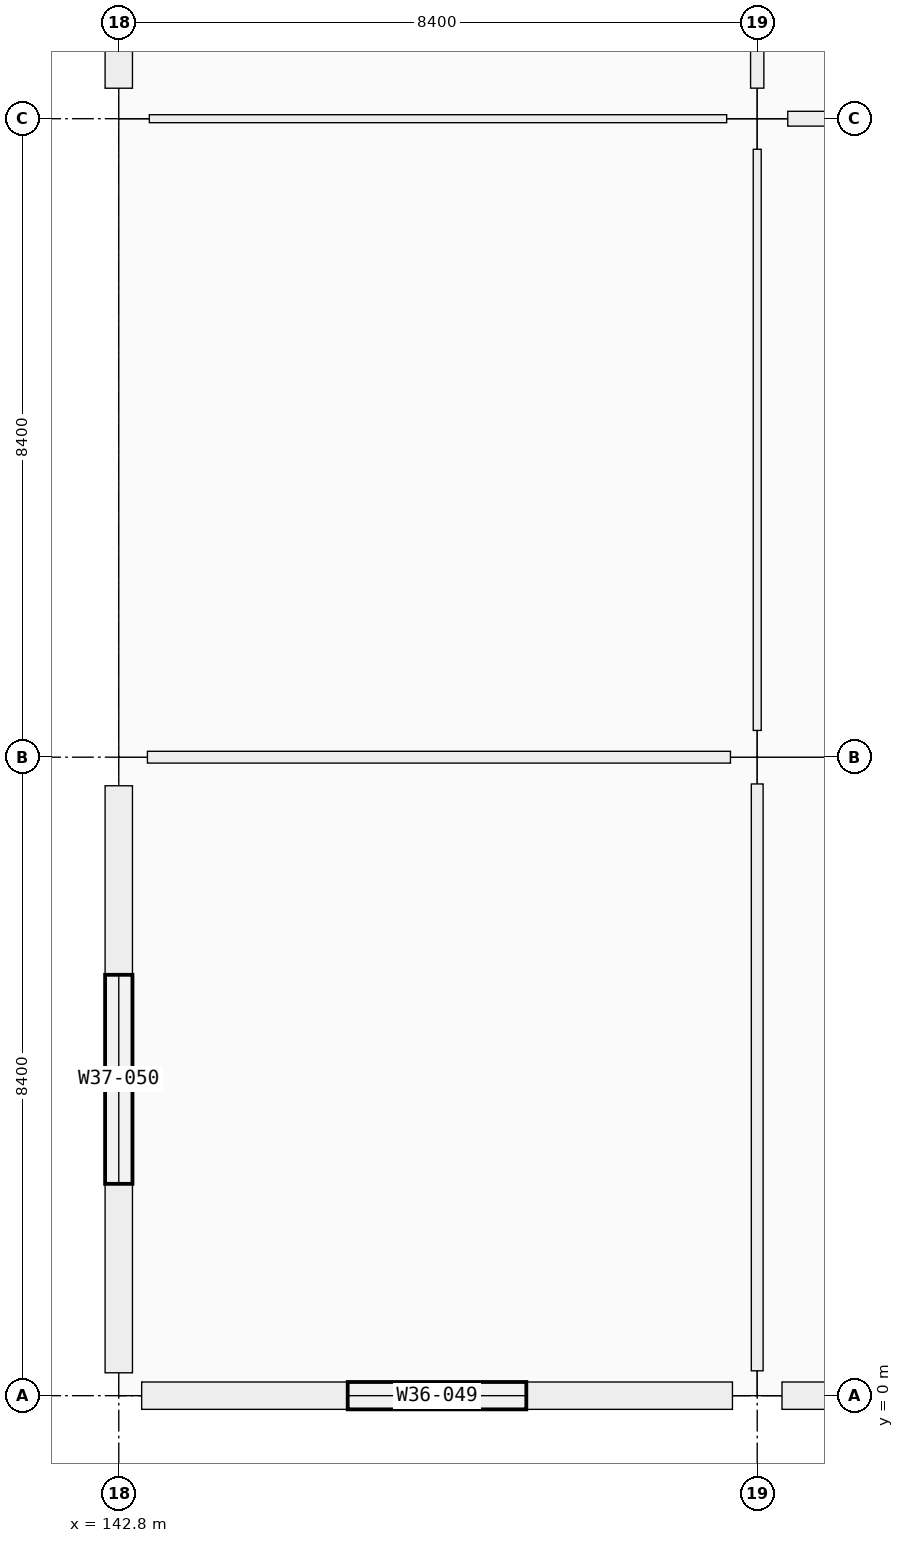
"""IFC4 building model, lengths in metres.
Left out: names, types, materials, properties, quantities, classifications, styles, units other than length and angle.
Written with IfcOpenShell. Run it as: python <this file> out.ifc"""

import sys

from ifc_helpers import new_model, si_unit, direction, frame, frame_2d, origin, origin_2d, place, context, subcontext, project, spatial, rectangle, extrude, element, fill, save


model = new_model("IFC4")
c1 = context("Model", 3, precision=1e-05, world=origin(), true_north=direction((0.0, 1.0)))
c2 = subcontext(c1, "Body", "Model", "MODEL_VIEW")
j1 = project(units=[si_unit("LENGTHUNIT", "METRE"), si_unit("PLANEANGLEUNIT", "RADIAN")], contexts=[c1])
p1 = place(None, origin())
s1 = spatial("IfcSite", under=j1, at=p1, CompositionType="ELEMENT")
p2 = place(p1, origin())
s2 = spatial("IfcBuilding", under=s1, at=p2, CompositionType="ELEMENT")
p3 = place(p2, origin())
s3 = spatial("IfcBuildingStorey", under=s2, at=p3, CompositionType="ELEMENT", Elevation=0.0)
p4 = place(p3, frame((142.8, 0.0, 0.0), z_axis=(0.0, 0.0, 1.0), x_axis=(1.0, 0.0, 0.0)))
e1 = element("IfcColumn", 1, at=p4, inside=s3, PredefinedType="COLUMN", context=c2, shape_type="SweptSolid", body=[
    extrude(rectangle(XDim=0.6, YDim=0.6, at=origin_2d()), origin(), (0.0, 0.0, 1.0), 5.76),
])
p5 = place(p3, frame((142.8, 8.4, 0.0), z_axis=(0.0, 0.0, 1.0), x_axis=(1.0, 0.0, 0.0)))
e2 = element("IfcColumn", 2, at=p5, inside=s3, PredefinedType="COLUMN", context=c2, shape_type="SweptSolid", body=[
    extrude(rectangle(XDim=0.75, YDim=0.75, at=origin_2d()), origin(), (0.0, 0.0, 1.0), 5.76),
])
p6 = place(p3, frame((142.8, 16.8, 0.0), z_axis=(0.0, 0.0, 1.0), x_axis=(1.0, 0.0, 0.0)))
e3 = element("IfcColumn", 3, at=p6, inside=s3, PredefinedType="COLUMN", context=c2, shape_type="SweptSolid", body=[
    extrude(rectangle(XDim=0.8, YDim=0.8, at=origin_2d()), origin(), (0.0, 0.0, 1.0), 5.76),
])
p7 = place(p3, frame((151.2, 0.0, 0.0), z_axis=(0.0, 0.0, 1.0), x_axis=(1.0, 0.0, 0.0)))
e4 = element("IfcColumn", 4, at=p7, inside=s3, PredefinedType="COLUMN", context=c2, shape_type="SweptSolid", body=[
    extrude(rectangle(XDim=0.65, YDim=0.65, at=origin_2d()), origin(), (0.0, 0.0, 1.0), 5.76),
])
p8 = place(p3, frame((151.2, 8.4, 0.0), z_axis=(0.0, 0.0, 1.0), x_axis=(1.0, 0.0, 0.0)))
e5 = element("IfcColumn", 5, at=p8, inside=s3, PredefinedType="COLUMN", context=c2, shape_type="SweptSolid", body=[
    extrude(rectangle(XDim=0.7, YDim=0.7, at=origin_2d()), origin(), (0.0, 0.0, 1.0), 5.76),
])
p9 = place(p3, frame((151.2, 16.8, 0.0), z_axis=(0.0, 0.0, 1.0), x_axis=(1.0, 0.0, 0.0)))
e6 = element("IfcColumn", 6, at=p9, inside=s3, PredefinedType="COLUMN", context=c2, shape_type="SweptSolid", body=[
    extrude(rectangle(XDim=0.8, YDim=0.8, at=origin_2d()), origin(), (0.0, 0.0, 1.0), 5.76),
])
p10 = place(p3, frame((150.874, 0.0, 0.0), z_axis=(0.0, 0.0, 1.0), x_axis=(-1.0, 0.0, 0.0)))
e7 = element("IfcWall", 7, at=p10, inside=s3, PredefinedType="SOLIDWALL", context=c2, shape_type="SweptSolid", body=[
    extrude(rectangle(XDim=7.773, YDim=0.36, at=frame_2d((3.886, 0.0))), origin(), (0.0, 0.0, 1.0), 4.7),
])
p11 = place(p10, frame((2.712, 0.0, 0.9)))
e8 = element("IfcOpeningElement", 8, at=p11, cuts=e7, PredefinedType="OPENING", context=c2, shape_type="SweptSolid", body=[
    extrude(rectangle(XDim=2.35, YDim=1.6, at=frame_2d((1.175, 0.8))), frame((0.0, 0.18, 0.0), z_axis=(0.0, -1.0, 0.0), x_axis=(1.0, 0.0, 0.0)), (0.0, 0.0, 1.0), 0.36),
])
p12 = place(p3, frame((142.8, 0.301, 0.0), z_axis=(0.0, 0.0, 1.0), x_axis=(0.0, 1.0, 0.0)))
e9 = element("IfcWall", 9, at=p12, inside=s3, PredefinedType="SOLIDWALL", context=c2, shape_type="SweptSolid", body=[
    extrude(rectangle(XDim=7.723, YDim=0.36, at=frame_2d((3.861, 0.0))), origin(), (0.0, 0.0, 1.0), 4.7),
])
p13 = place(p12, frame((2.486, 0.0, 0.9)))
e10 = element("IfcOpeningElement", 10, at=p13, cuts=e9, PredefinedType="OPENING", context=c2, shape_type="SweptSolid", body=[
    extrude(rectangle(XDim=2.75, YDim=1.6, at=frame_2d((1.375, 0.8))), frame((0.0, 0.18, 0.0), z_axis=(0.0, -1.0, 0.0), x_axis=(1.0, 0.0, 0.0)), (0.0, 0.0, 1.0), 0.36),
])
p14 = place(p3, frame((142.8, 17.201, 0.0), z_axis=(0.0, 0.0, 1.0), x_axis=(0.0, 1.0, 0.0)))
e11 = element("IfcWall", 11, at=p14, inside=s3, PredefinedType="SOLIDWALL", context=c2, shape_type="SweptSolid", body=[
    extrude(rectangle(XDim=7.598, YDim=0.36, at=frame_2d((3.799, 0.0))), origin(), (0.0, 0.0, 1.0), 4.7),
])
p15 = place(p14, frame((3.024, 0.0, 0.9)))
e12 = element("IfcOpeningElement", 12, at=p15, cuts=e11, PredefinedType="OPENING", context=c2, shape_type="SweptSolid", body=[
    extrude(rectangle(XDim=1.55, YDim=1.6, at=frame_2d((0.775, 0.8))), frame((0.0, 0.18, 0.0), z_axis=(0.0, -1.0, 0.0), x_axis=(1.0, 0.0, 0.0)), (0.0, 0.0, 1.0), 0.36),
])
p16 = place(p3, frame((159.299, 0.0, 0.0), z_axis=(0.0, 0.0, 1.0), x_axis=(-1.0, 0.0, 0.0)))
e13 = element("IfcWall", 13, at=p16, inside=s3, PredefinedType="SOLIDWALL", context=c2, shape_type="SweptSolid", body=[
    extrude(rectangle(XDim=7.773, YDim=0.36, at=frame_2d((3.887, 0.0))), origin(), (0.0, 0.0, 1.0), 4.7),
])
p17 = place(p16, frame((2.736, 0.0, 0.0)))
e14 = element("IfcOpeningElement", 14, at=p17, cuts=e13, PredefinedType="OPENING", context=c2, shape_type="SweptSolid", body=[
    extrude(rectangle(XDim=2.3, YDim=2.3, at=frame_2d((1.15, 1.15))), frame((0.0, 0.18, 0.0), z_axis=(0.0, -1.0, 0.0), x_axis=(1.0, 0.0, 0.0)), (0.0, 0.0, 1.0), 0.36),
])
p18 = place(p3, frame((143.177, 8.4, 0.0), z_axis=(0.0, 0.0, 1.0), x_axis=(1.0, 0.0, 0.0)))
e15 = element("IfcWall", 15, at=p18, inside=s3, PredefinedType="PARTITIONING", context=c2, shape_type="SweptSolid", body=[
    extrude(rectangle(XDim=7.671, YDim=0.155, at=frame_2d((3.835, 0.0))), origin(), (0.0, 0.0, 1.0), 3.66),
])
p19 = place(p18, frame((3.331, 0.0, 0.0)))
e16 = element("IfcOpeningElement", 16, at=p19, cuts=e15, PredefinedType="OPENING", context=c2, shape_type="SweptSolid", body=[
    extrude(rectangle(XDim=1.01, YDim=2.12, at=frame_2d((0.505, 1.06))), frame((0.0, 0.078, 0.0), z_axis=(0.0, -1.0, 0.0), x_axis=(1.0, 0.0, 0.0)), (0.0, 0.0, 1.0), 0.155),
])
p20 = place(p3, frame((143.202, 16.8, 0.0), z_axis=(0.0, 0.0, 1.0), x_axis=(1.0, 0.0, 0.0)))
e17 = element("IfcWall", 17, at=p20, inside=s3, PredefinedType="PARTITIONING", context=c2, shape_type="SweptSolid", body=[
    extrude(rectangle(XDim=7.596, YDim=0.105, at=frame_2d((3.798, 0.0))), origin(), (0.0, 0.0, 1.0), 3.66),
])
p21 = place(p20, frame((3.313, 0.0, 0.0)))
e18 = element("IfcOpeningElement", 18, at=p21, cuts=e17, PredefinedType="OPENING", context=c2, shape_type="SweptSolid", body=[
    extrude(rectangle(XDim=0.97, YDim=2.12, at=frame_2d((0.485, 1.06))), frame((0.0, 0.052, 0.0), z_axis=(0.0, -1.0, 0.0), x_axis=(1.0, 0.0, 0.0)), (0.0, 0.0, 1.0), 0.105),
])
p22 = place(p3, frame((151.602, 16.8, 0.0), z_axis=(0.0, 0.0, 1.0), x_axis=(1.0, 0.0, 0.0)))
e19 = element("IfcWall", 19, at=p22, inside=s3, PredefinedType="PARTITIONING", context=c2, shape_type="SweptSolid", body=[
    extrude(rectangle(XDim=7.596, YDim=0.195, at=frame_2d((3.798, 0.0))), origin(), (0.0, 0.0, 1.0), 3.66),
])
p23 = place(p22, frame((3.288, 0.0, 0.0)))
e20 = element("IfcOpeningElement", 20, at=p23, cuts=e19, PredefinedType="OPENING", context=c2, shape_type="SweptSolid", body=[
    extrude(rectangle(XDim=1.02, YDim=2.2, at=frame_2d((0.51, 1.1))), frame((0.0, 0.098, 0.0), z_axis=(0.0, -1.0, 0.0), x_axis=(1.0, 0.0, 0.0)), (0.0, 0.0, 1.0), 0.195),
])
p24 = place(p3, frame((151.2, 0.327, 0.0), z_axis=(0.0, 0.0, 1.0), x_axis=(0.0, 1.0, 0.0)))
e21 = element("IfcWall", 21, at=p24, inside=s3, PredefinedType="PARTITIONING", context=c2, shape_type="SweptSolid", body=[
    extrude(rectangle(XDim=7.721, YDim=0.155, at=frame_2d((3.861, 0.0))), origin(), (0.0, 0.0, 1.0), 3.66),
])
p25 = place(p24, frame((3.376, 0.0, 0.0)))
e22 = element("IfcOpeningElement", 22, at=p25, cuts=e21, PredefinedType="OPENING", context=c2, shape_type="SweptSolid", body=[
    extrude(rectangle(XDim=0.97, YDim=2.12, at=frame_2d((0.485, 1.06))), frame((0.0, 0.078, 0.0), z_axis=(0.0, -1.0, 0.0), x_axis=(1.0, 0.0, 0.0)), (0.0, 0.0, 1.0), 0.155),
])
p26 = place(p3, frame((151.2, 8.752, 0.0), z_axis=(0.0, 0.0, 1.0), x_axis=(0.0, 1.0, 0.0)))
e23 = element("IfcWall", 23, at=p26, inside=s3, PredefinedType="PARTITIONING", context=c2, shape_type="SweptSolid", body=[
    extrude(rectangle(XDim=7.646, YDim=0.105, at=frame_2d((3.823, 0.0))), origin(), (0.0, 0.0, 1.0), 3.66),
])
p27 = place(p26, frame((3.358, 0.0, 0.0)))
e24 = element("IfcOpeningElement", 24, at=p27, cuts=e23, PredefinedType="OPENING", context=c2, shape_type="SweptSolid", body=[
    extrude(rectangle(XDim=0.93, YDim=2.12, at=frame_2d((0.465, 1.06))), frame((0.0, 0.052, 0.0), z_axis=(0.0, -1.0, 0.0), x_axis=(1.0, 0.0, 0.0)), (0.0, 0.0, 1.0), 0.105),
])
p28 = place(p3, frame((151.2, 17.202, 0.0), z_axis=(0.0, 0.0, 1.0), x_axis=(0.0, 1.0, 0.0)))
e25 = element("IfcWall", 25, at=p28, inside=s3, PredefinedType="PARTITIONING", context=c2, shape_type="SweptSolid", body=[
    extrude(rectangle(XDim=7.596, YDim=0.175, at=frame_2d((3.798, 0.0))), origin(), (0.0, 0.0, 1.0), 3.66),
])
p29 = place(p28, frame((3.278, 0.0, 0.0)))
e26 = element("IfcOpeningElement", 26, at=p29, cuts=e25, PredefinedType="OPENING", context=c2, shape_type="SweptSolid", body=[
    extrude(rectangle(XDim=1.04, YDim=2.2, at=frame_2d((0.52, 1.1))), frame((0.0, 0.087, 0.0), z_axis=(0.0, -1.0, 0.0), x_axis=(1.0, 0.0, 0.0)), (0.0, 0.0, 1.0), 0.175),
])
p30 = place(p11, origin())
e27 = element("IfcWindow", 27, at=p30, inside=s3, PartitioningType="SINGLE_PANEL", PredefinedType="WINDOW", context=c2, shape_type="SweptSolid", body=[
    extrude(rectangle(XDim=2.35, YDim=1.6, at=frame_2d((1.175, 0.8))), frame((0.0, 0.03, 0.0), z_axis=(0.0, -1.0, 0.0), x_axis=(1.0, 0.0, 0.0)), (0.0, 0.0, 1.0), 0.06),
])
fill(e8, e27)
p31 = place(p13, origin())
e28 = element("IfcWindow", 28, at=p31, inside=s3, PartitioningType="SINGLE_PANEL", PredefinedType="WINDOW", context=c2, shape_type="SweptSolid", body=[
    extrude(rectangle(XDim=2.75, YDim=1.6, at=frame_2d((1.375, 0.8))), frame((0.0, 0.03, 0.0), z_axis=(0.0, -1.0, 0.0), x_axis=(1.0, 0.0, 0.0)), (0.0, 0.0, 1.0), 0.06),
])
fill(e10, e28)
p32 = place(p19, origin())
e29 = element("IfcDoor", 29, at=p32, inside=s3, OperationType="SINGLE_SWING_RIGHT", PredefinedType="DOOR", context=c2, shape_type="SweptSolid", body=[
    extrude(rectangle(XDim=1.01, YDim=2.12, at=frame_2d((0.505, 1.06))), frame((0.0, 0.025, 0.0), z_axis=(0.0, -1.0, 0.0), x_axis=(1.0, 0.0, 0.0)), (0.0, 0.0, 1.0), 0.05),
])
fill(e16, e29)
p33 = place(p21, origin())
e30 = element("IfcDoor", 30, at=p33, inside=s3, OperationType="SINGLE_SWING_LEFT", PredefinedType="DOOR", context=c2, shape_type="SweptSolid", body=[
    extrude(rectangle(XDim=0.97, YDim=2.12, at=frame_2d((0.485, 1.06))), frame((0.0, 0.025, 0.0), z_axis=(0.0, -1.0, 0.0), x_axis=(1.0, 0.0, 0.0)), (0.0, 0.0, 1.0), 0.05),
])
fill(e18, e30)
p34 = place(p25, origin())
e31 = element("IfcDoor", 31, at=p34, inside=s3, OperationType="SINGLE_SWING_RIGHT", PredefinedType="DOOR", context=c2, shape_type="SweptSolid", body=[
    extrude(rectangle(XDim=0.97, YDim=2.12, at=frame_2d((0.485, 1.06))), frame((0.0, 0.025, 0.0), z_axis=(0.0, -1.0, 0.0), x_axis=(1.0, 0.0, 0.0)), (0.0, 0.0, 1.0), 0.05),
])
fill(e22, e31)
p35 = place(p27, origin())
e32 = element("IfcDoor", 32, at=p35, inside=s3, OperationType="SINGLE_SWING_LEFT", PredefinedType="DOOR", context=c2, shape_type="SweptSolid", body=[
    extrude(rectangle(XDim=0.93, YDim=2.12, at=frame_2d((0.465, 1.06))), frame((0.0, 0.025, 0.0), z_axis=(0.0, -1.0, 0.0), x_axis=(1.0, 0.0, 0.0)), (0.0, 0.0, 1.0), 0.05),
])
fill(e24, e32)
save(model, sys.argv[1])
